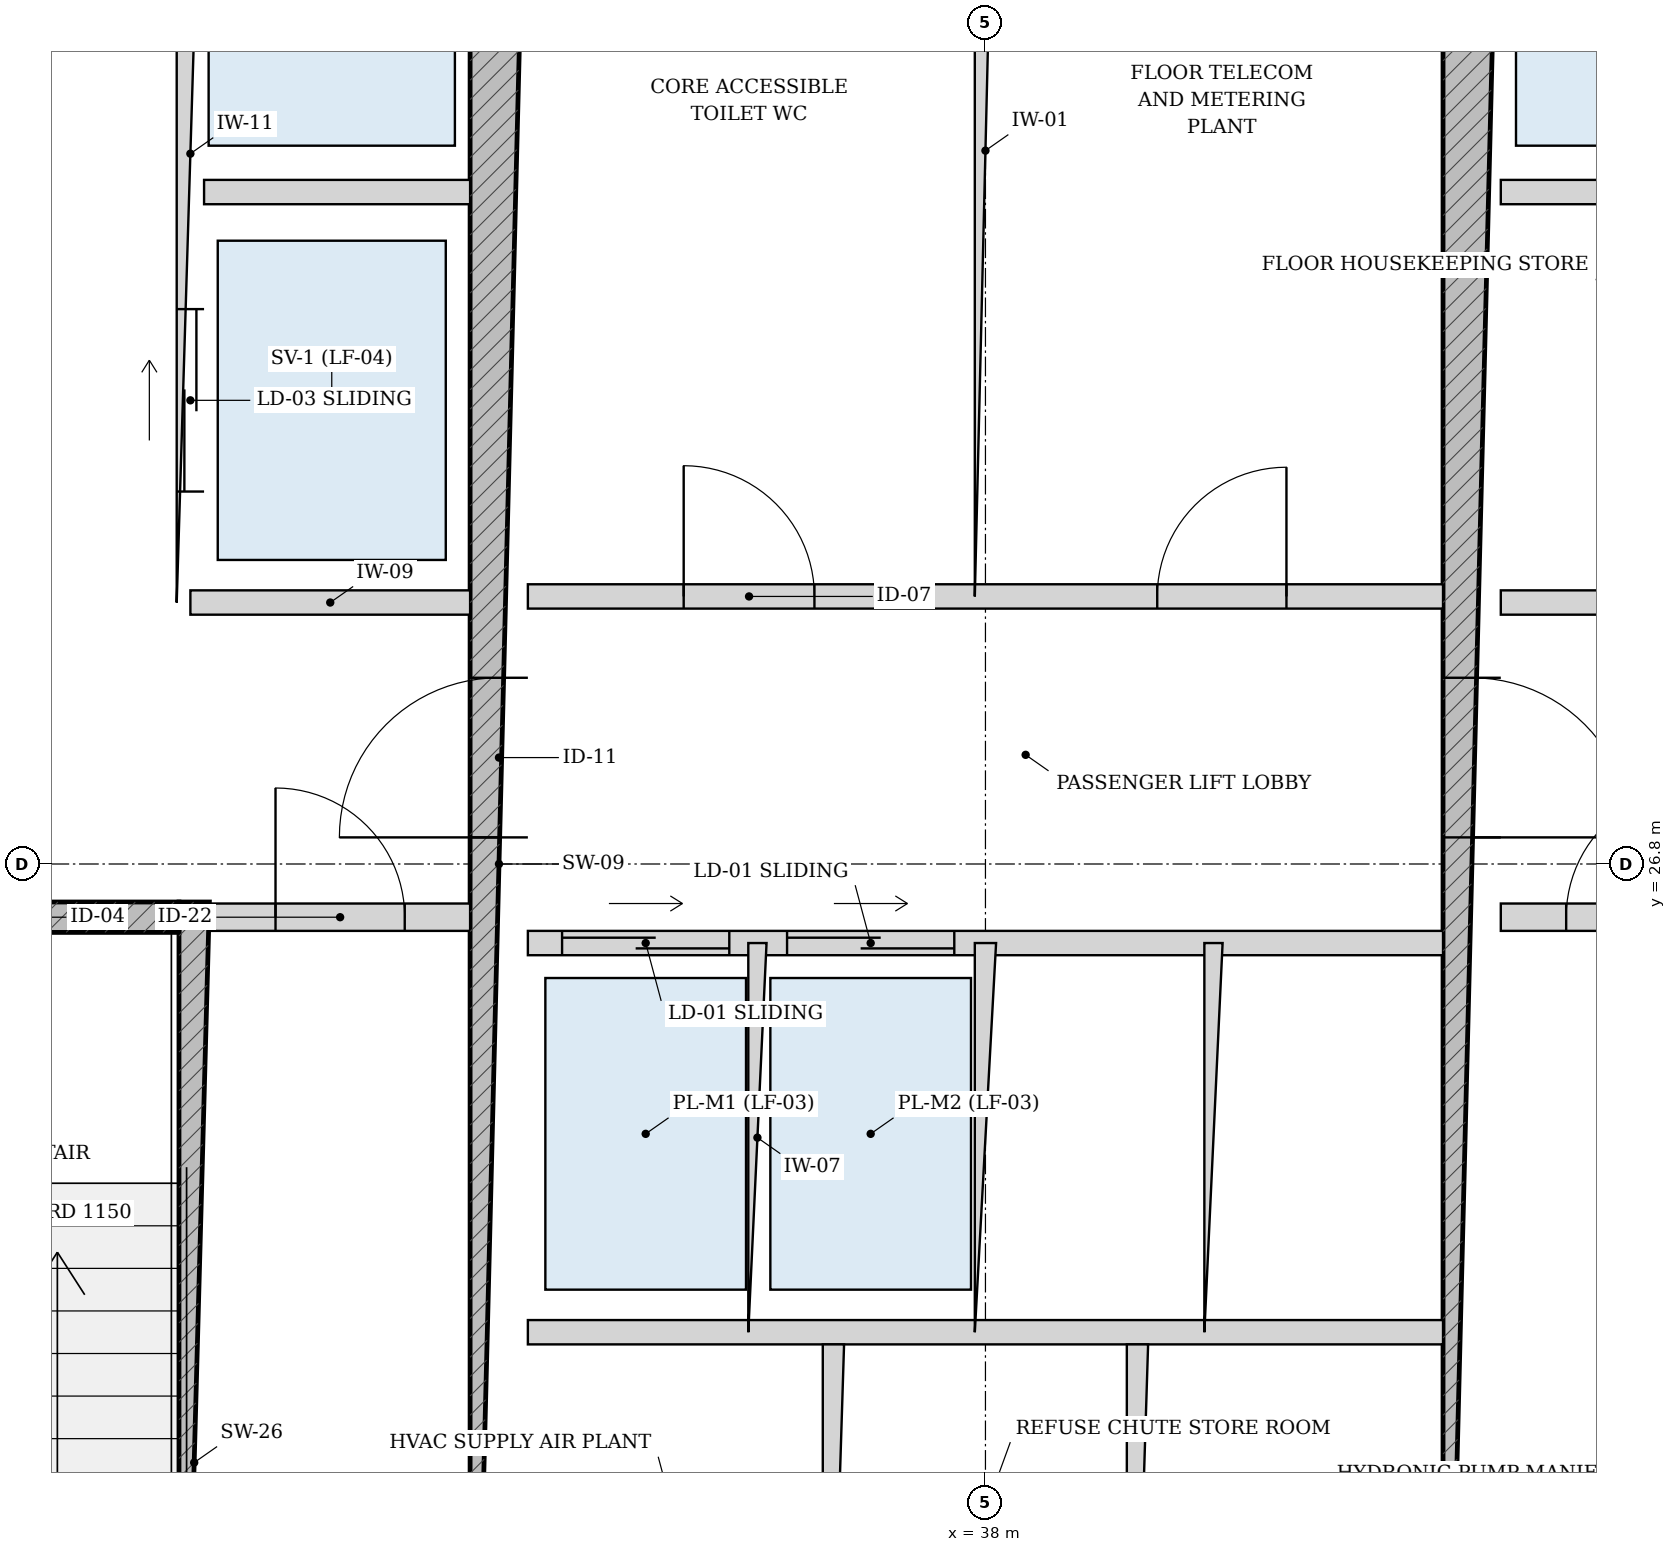
"""IFC4 building model, lengths in metres.
Left out: names, types, materials, properties, quantities, classifications, styles, units other than length and angle.
Written with IfcOpenShell. Run it as: python <this file> out.ifc"""

import sys

from ifc_helpers import new_model, si_unit, direction, frame, frame_2d, origin, place, context, subcontext, project, spatial, rectangle, extrude, source, transform, mapped, element, fill, save


model = new_model("IFC4")
c1 = context("Model", 3, precision=1e-05, world=origin(), true_north=direction((-0.2419218956, 0.970295726276)))
c2 = subcontext(c1, "Body", "Model", "MODEL_VIEW")
j1 = project(units=[si_unit("LENGTHUNIT", "METRE"), si_unit("PLANEANGLEUNIT", "RADIAN")], contexts=[c1])
p1 = place(None, origin())
s1 = spatial("IfcSite", under=j1, at=p1, CompositionType="ELEMENT")
p2 = place(p1, origin())
s2 = spatial("IfcBuilding", under=s1, at=p2, CompositionType="ELEMENT")
p3 = place(p2, frame((0.0, 0.0, 142.6)))
s3 = spatial("IfcBuildingStorey", under=s2, at=p3, CompositionType="ELEMENT", Elevation=142.6)
p4 = place(p3, frame((32.795, 19.175, 0.0), z_axis=(0.0, 0.0, 1.0), x_axis=(0.0, 1.0, 0.0)))
e1 = element("IfcWall", 1, at=p4, inside=s3, PredefinedType="SOLIDWALL", context=c2, shape_type="SweptSolid", body=[
    extrude(rectangle(XDim=7.375, YDim=0.2, at=frame_2d((3.688, 0.0))), origin(), (0.0, 0.0, 1.0), 3.33),
])
p5 = place(p3, frame((29.375, 26.45, 0.0), z_axis=(0.0, 0.0, 1.0), x_axis=(1.0, 0.0, 0.0)))
e2 = element("IfcWall", 2, at=p5, inside=s3, PredefinedType="SOLIDWALL", context=c2, shape_type="SweptSolid", body=[
    extrude(rectangle(XDim=3.32, YDim=0.2, at=frame_2d((1.66, 0.0))), origin(), (0.0, 0.0, 1.0), 3.33),
])
p6 = place(p5, frame((1.185, 0.0, 0.0)))
e3 = element("IfcOpeningElement", 3, at=p6, cuts=e2, PredefinedType="OPENING", context=c2, shape_type="SweptSolid", body=[
    extrude(rectangle(XDim=0.95, YDim=2.15, at=frame_2d((0.475, 1.075))), frame((0.0, 0.11, 0.0), z_axis=(0.0, -1.0, 0.0), x_axis=(1.0, 0.0, 0.0)), (0.0, 0.0, 1.0), 0.22),
])
p7 = place(p3, frame((34.8, 19.175, 0.0), z_axis=(0.0, 0.0, 1.0), x_axis=(0.0, 1.0, 0.0)))
e4 = element("IfcWall", 4, at=p7, inside=s3, PredefinedType="SHEAR", context=c2, shape_type="SweptSolid", body=[
    extrude(rectangle(XDim=15.25, YDim=0.38, at=frame_2d((7.625, 0.0))), origin(), (0.0, 0.0, 1.0), 3.33),
])
p8 = place(p7, frame((7.8, 0.0, 0.0)))
e5 = element("IfcOpeningElement", 5, at=p8, cuts=e4, PredefinedType="OPENING", context=c2, shape_type="SweptSolid", body=[
    extrude(rectangle(XDim=1.05, YDim=2.15, at=frame_2d((0.525, 1.075))), frame((0.0, 0.2, 0.0), z_axis=(0.0, -1.0, 0.0), x_axis=(1.0, 0.0, 0.0)), (0.0, 0.0, 1.0), 0.4),
])
p9 = place(p3, frame((41.2, 19.175, 0.0), z_axis=(0.0, 0.0, 1.0), x_axis=(0.0, 1.0, 0.0)))
e6 = element("IfcWall", 6, at=p9, inside=s3, PredefinedType="SHEAR", context=c2, shape_type="SweptSolid", body=[
    extrude(rectangle(XDim=15.25, YDim=0.38, at=frame_2d((7.625, 0.0))), origin(), (0.0, 0.0, 1.0), 3.33),
])
p10 = place(p9, frame((7.8, 0.0, 0.0)))
e7 = element("IfcOpeningElement", 7, at=p10, cuts=e6, PredefinedType="OPENING", context=c2, shape_type="SweptSolid", body=[
    extrude(rectangle(XDim=1.05, YDim=2.15, at=frame_2d((0.525, 1.075))), frame((0.0, 0.2, 0.0), z_axis=(0.0, -1.0, 0.0), x_axis=(1.0, 0.0, 0.0)), (0.0, 0.0, 1.0), 0.4),
])
p11 = place(p3, frame((32.9, 26.45, 0.0), z_axis=(0.0, 0.0, 1.0), x_axis=(1.0, 0.0, 0.0)))
e8 = element("IfcWall", 8, at=p11, inside=s3, PredefinedType="PARTITIONING", context=c2, shape_type="SweptSolid", body=[
    extrude(rectangle(XDim=1.71, YDim=0.18, at=frame_2d((0.855, 0.0))), origin(), (0.0, 0.0, 1.0), 3.33),
])
p12 = place(p11, frame((0.43, 0.0, 0.0)))
e9 = element("IfcOpeningElement", 9, at=p12, cuts=e8, PredefinedType="OPENING", context=c2, shape_type="SweptSolid", body=[
    extrude(rectangle(XDim=0.85, YDim=2.1, at=frame_2d((0.425, 1.05))), frame((0.0, 0.1, 0.0), z_axis=(0.0, -1.0, 0.0), x_axis=(1.0, 0.0, 0.0)), (0.0, 0.0, 1.0), 0.2),
])
p13 = place(p3, frame((41.39, 26.45, 0.0), z_axis=(0.0, 0.0, 1.0), x_axis=(1.0, 0.0, 0.0)))
e10 = element("IfcWall", 10, at=p13, inside=s3, PredefinedType="PARTITIONING", context=c2, shape_type="SweptSolid", body=[
    extrude(rectangle(XDim=1.71, YDim=0.18, at=frame_2d((0.855, 0.0))), origin(), (0.0, 0.0, 1.0), 3.33),
])
p14 = place(p13, frame((0.43, 0.0, 0.0)))
e11 = element("IfcOpeningElement", 11, at=p14, cuts=e10, PredefinedType="OPENING", context=c2, shape_type="SweptSolid", body=[
    extrude(rectangle(XDim=0.85, YDim=2.1, at=frame_2d((0.425, 1.05))), frame((0.0, 0.1, 0.0), z_axis=(0.0, -1.0, 0.0), x_axis=(1.0, 0.0, 0.0)), (0.0, 0.0, 1.0), 0.2),
])
p15 = place(p3, frame((32.77, 28.52, 0.0), z_axis=(0.0, 0.0, 1.0), x_axis=(0.0, 1.0, 0.0)))
e12 = element("IfcWall", 12, at=p15, inside=s3, PredefinedType="PARTITIONING", context=c2, shape_type="SweptSolid", body=[
    extrude(rectangle(XDim=5.905, YDim=0.18, at=frame_2d((2.953, 0.0))), origin(), (0.0, 0.0, 1.0), 3.33),
])
p16 = place(p15, frame((3.655, 0.0, 0.0)))
e13 = element("IfcOpeningElement", 13, at=p16, cuts=e12, PredefinedType="OPENING", context=c2, shape_type="SweptSolid", body=[
    extrude(rectangle(XDim=1.15, YDim=2.2, at=frame_2d((0.575, 1.1))), frame((0.0, 0.1, 0.0), z_axis=(0.0, -1.0, 0.0), x_axis=(1.0, 0.0, 0.0)), (0.0, 0.0, 1.0), 0.2),
])
p17 = place(p15, frame((0.73, 0.0, 0.0)))
e14 = element("IfcOpeningElement", 14, at=p17, cuts=e12, PredefinedType="OPENING", context=c2, shape_type="SweptSolid", body=[
    extrude(rectangle(XDim=1.2, YDim=2.25, at=frame_2d((0.6, 1.125))), frame((0.0, 0.1, 0.0), z_axis=(0.0, -1.0, 0.0), x_axis=(1.0, 0.0, 0.0)), (0.0, 0.0, 1.0), 0.2),
])
p18 = place(p3, frame((32.86, 31.22, 0.0), z_axis=(0.0, 0.0, 1.0), x_axis=(1.0, 0.0, 0.0)))
e15 = element("IfcWall", 15, at=p18, inside=s3, PredefinedType="PARTITIONING", context=c2, shape_type="SweptSolid", body=[
    extrude(rectangle(XDim=1.75, YDim=0.16, at=frame_2d((0.875, 0.0))), origin(), (0.0, 0.0, 1.0), 3.33),
])
p19 = place(p3, frame((32.77, 28.52, 0.0), z_axis=(0.0, 0.0, 1.0), x_axis=(1.0, 0.0, 0.0)))
e16 = element("IfcWall", 16, at=p19, inside=s3, PredefinedType="PARTITIONING", context=c2, shape_type="SweptSolid", body=[
    extrude(rectangle(XDim=1.84, YDim=0.16, at=frame_2d((0.92, 0.0))), origin(), (0.0, 0.0, 1.0), 3.33),
])
p20 = place(p3, frame((41.39, 31.22, 0.0), z_axis=(0.0, 0.0, 1.0), x_axis=(1.0, 0.0, 0.0)))
e17 = element("IfcWall", 17, at=p20, inside=s3, PredefinedType="PARTITIONING", context=c2, shape_type="SweptSolid", body=[
    extrude(rectangle(XDim=1.75, YDim=0.16, at=frame_2d((0.875, 0.0))), origin(), (0.0, 0.0, 1.0), 3.33),
])
p21 = place(p3, frame((41.39, 28.52, 0.0), z_axis=(0.0, 0.0, 1.0), x_axis=(1.0, 0.0, 0.0)))
e18 = element("IfcWall", 18, at=p21, inside=s3, PredefinedType="PARTITIONING", context=c2, shape_type="SweptSolid", body=[
    extrude(rectangle(XDim=1.84, YDim=0.16, at=frame_2d((0.92, 0.0))), origin(), (0.0, 0.0, 1.0), 3.33),
])
p22 = place(p3, frame((34.99, 28.56, 0.0), z_axis=(0.0, 0.0, 1.0), x_axis=(1.0, 0.0, 0.0)))
e19 = element("IfcWall", 19, at=p22, inside=s3, PredefinedType="PARTITIONING", context=c2, shape_type="SweptSolid", body=[
    extrude(rectangle(XDim=6.02, YDim=0.16, at=frame_2d((3.01, 0.0))), origin(), (0.0, 0.0, 1.0), 3.33),
])
p23 = place(p22, frame((1.025, 0.0, 0.0)))
e20 = element("IfcOpeningElement", 20, at=p23, cuts=e19, PredefinedType="OPENING", context=c2, shape_type="SweptSolid", body=[
    extrude(rectangle(XDim=0.86, YDim=2.1, at=frame_2d((0.43, 1.05))), frame((0.0, 0.09, 0.0), z_axis=(0.0, -1.0, 0.0), x_axis=(1.0, 0.0, 0.0)), (0.0, 0.0, 1.0), 0.18),
])
p24 = place(p22, frame((4.14, 0.0, 0.0)))
e21 = element("IfcOpeningElement", 21, at=p24, cuts=e19, PredefinedType="OPENING", context=c2, shape_type="SweptSolid", body=[
    extrude(rectangle(XDim=0.85, YDim=2.1, at=frame_2d((0.425, 1.05))), frame((0.0, 0.09, 0.0), z_axis=(0.0, -1.0, 0.0), x_axis=(1.0, 0.0, 0.0)), (0.0, 0.0, 1.0), 0.18),
])
p25 = place(p3, frame((38.0, 28.56, 0.0), z_axis=(0.0, 0.0, 1.0), x_axis=(0.0, 1.0, 0.0)))
e22 = element("IfcWall", 22, at=p25, inside=s3, PredefinedType="PARTITIONING", context=c2, shape_type="SweptSolid", body=[
    extrude(rectangle(XDim=5.865, YDim=0.14, at=frame_2d((2.933, 0.0))), origin(), (0.0, 0.0, 1.0), 3.33),
])
p26 = place(p3, frame((34.99, 26.28, 0.0), z_axis=(0.0, 0.0, 1.0), x_axis=(1.0, 0.0, 0.0)))
e23 = element("IfcWall", 23, at=p26, inside=s3, PredefinedType="PARTITIONING", context=c2, shape_type="SweptSolid", body=[
    extrude(rectangle(XDim=6.02, YDim=0.16, at=frame_2d((3.01, 0.0))), origin(), (0.0, 0.0, 1.0), 3.33),
])
p27 = place(p26, frame((0.225, 0.0, 0.0)))
e24 = element("IfcOpeningElement", 24, at=p27, cuts=e23, PredefinedType="OPENING", context=c2, shape_type="SweptSolid", body=[
    extrude(rectangle(XDim=1.1, YDim=2.2, at=frame_2d((0.55, 1.1))), frame((0.0, 0.09, 0.0), z_axis=(0.0, -1.0, 0.0), x_axis=(1.0, 0.0, 0.0)), (0.0, 0.0, 1.0), 0.18),
])
p28 = place(p26, frame((1.705, 0.0, 0.0)))
e25 = element("IfcOpeningElement", 25, at=p28, cuts=e23, PredefinedType="OPENING", context=c2, shape_type="SweptSolid", body=[
    extrude(rectangle(XDim=1.1, YDim=2.2, at=frame_2d((0.55, 1.1))), frame((0.0, 0.09, 0.0), z_axis=(0.0, -1.0, 0.0), x_axis=(1.0, 0.0, 0.0)), (0.0, 0.0, 1.0), 0.18),
])
p29 = place(p3, frame((34.99, 23.72, 0.0), z_axis=(0.0, 0.0, 1.0), x_axis=(1.0, 0.0, 0.0)))
e26 = element("IfcWall", 26, at=p29, inside=s3, PredefinedType="PARTITIONING", context=c2, shape_type="SweptSolid", body=[
    extrude(rectangle(XDim=6.02, YDim=0.16, at=frame_2d((3.01, 0.0))), origin(), (0.0, 0.0, 1.0), 3.33),
])
p30 = place(p3, frame((36.5, 23.72, 0.0), z_axis=(0.0, 0.0, 1.0), x_axis=(0.0, 1.0, 0.0)))
e27 = element("IfcWall", 27, at=p30, inside=s3, PredefinedType="PARTITIONING", context=c2, shape_type="SweptSolid", body=[
    extrude(rectangle(XDim=2.56, YDim=0.12, at=frame_2d((1.28, 0.0))), origin(), (0.0, 0.0, 1.0), 3.33),
])
p31 = place(p3, frame((38.0, 23.72, 0.0), z_axis=(0.0, 0.0, 1.0), x_axis=(0.0, 1.0, 0.0)))
e28 = element("IfcWall", 28, at=p31, inside=s3, PredefinedType="PARTITIONING", context=c2, shape_type="SweptSolid", body=[
    extrude(rectangle(XDim=2.56, YDim=0.14, at=frame_2d((1.28, 0.0))), origin(), (0.0, 0.0, 1.0), 3.33),
])
p32 = place(p3, frame((39.5, 23.72, 0.0), z_axis=(0.0, 0.0, 1.0), x_axis=(0.0, 1.0, 0.0)))
e29 = element("IfcWall", 29, at=p32, inside=s3, PredefinedType="PARTITIONING", context=c2, shape_type="SweptSolid", body=[
    extrude(rectangle(XDim=2.56, YDim=0.12, at=frame_2d((1.28, 0.0))), origin(), (0.0, 0.0, 1.0), 3.33),
])
p33 = place(p3, frame((37.0, 19.175, 0.0), z_axis=(0.0, 0.0, 1.0), x_axis=(0.0, 1.0, 0.0)))
e30 = element("IfcWall", 30, at=p33, inside=s3, PredefinedType="PARTITIONING", context=c2, shape_type="SweptSolid", body=[
    extrude(rectangle(XDim=4.465, YDim=0.14, at=frame_2d((2.232, 0.0))), origin(), (0.0, 0.0, 1.0), 3.33),
])
p34 = place(p33, frame((1.808, 0.0, 0.0)))
e31 = element("IfcOpeningElement", 31, at=p34, cuts=e30, PredefinedType="OPENING", context=c2, shape_type="SweptSolid", body=[
    extrude(rectangle(XDim=0.85, YDim=2.1, at=frame_2d((0.425, 1.05))), frame((0.0, 0.08, 0.0), z_axis=(0.0, -1.0, 0.0), x_axis=(1.0, 0.0, 0.0)), (0.0, 0.0, 1.0), 0.16),
])
p35 = place(p3, frame((39.0, 19.175, 0.0), z_axis=(0.0, 0.0, 1.0), x_axis=(0.0, 1.0, 0.0)))
e32 = element("IfcWall", 32, at=p35, inside=s3, PredefinedType="PARTITIONING", context=c2, shape_type="SweptSolid", body=[
    extrude(rectangle(XDim=4.465, YDim=0.14, at=frame_2d((2.232, 0.0))), origin(), (0.0, 0.0, 1.0), 3.33),
])
p36 = place(p35, frame((1.808, 0.0, 0.0)))
e33 = element("IfcOpeningElement", 33, at=p36, cuts=e32, PredefinedType="OPENING", context=c2, shape_type="SweptSolid", body=[
    extrude(rectangle(XDim=0.85, YDim=2.1, at=frame_2d((0.425, 1.05))), frame((0.0, 0.08, 0.0), z_axis=(0.0, -1.0, 0.0), x_axis=(1.0, 0.0, 0.0)), (0.0, 0.0, 1.0), 0.16),
])
m1 = source(origin(), c2, "Body", "SweptSolid", [
    extrude(rectangle(XDim=1.05, YDim=2.15, at=frame_2d((0.525, 1.075))), frame((0.0, 0.025, 0.0), z_axis=(0.0, -1.0, 0.0), x_axis=(1.0, 0.0, 0.0)), (0.0, 0.0, 1.0), 0.05),
])
p37 = place(p8, origin())
e34 = element("IfcDoor", 34, at=p37, inside=s3, OperationType="SINGLE_SWING_LEFT", PredefinedType="DOOR", context=c2, shape_type="MappedRepresentation", body=[
    mapped(m1, transform((0.0, 0.0, 0.0), scale=1.0)),
])
fill(e5, e34)
p38 = place(p10, frame((1.05, 0.0, 0.0), z_axis=(0.0, 0.0, 1.0), x_axis=(-1.0, 0.0, 0.0)))
e35 = element("IfcDoor", 35, at=p38, inside=s3, OperationType="SINGLE_SWING_RIGHT", PredefinedType="DOOR", context=c2, shape_type="MappedRepresentation", body=[
    mapped(m1, transform((0.0, 0.0, 0.0), scale=1.0)),
])
fill(e7, e35)
m2 = source(origin(), c2, "Body", "SweptSolid", [
    extrude(rectangle(XDim=0.85, YDim=2.1, at=frame_2d((0.425, 1.05))), frame((0.0, 0.025, 0.0), z_axis=(0.0, -1.0, 0.0), x_axis=(1.0, 0.0, 0.0)), (0.0, 0.0, 1.0), 0.05),
])
p39 = place(p12, origin())
e36 = element("IfcDoor", 36, at=p39, inside=s3, OperationType="SINGLE_SWING_LEFT", PredefinedType="DOOR", context=c2, shape_type="MappedRepresentation", body=[
    mapped(m2, transform((0.0, 0.0, 0.0), scale=1.0)),
])
fill(e9, e36)
p40 = place(p14, origin())
e37 = element("IfcDoor", 37, at=p40, inside=s3, OperationType="SINGLE_SWING_RIGHT", PredefinedType="DOOR", context=c2, shape_type="MappedRepresentation", body=[
    mapped(m2, transform((0.0, 0.0, 0.0), scale=1.0)),
])
fill(e11, e37)
m3 = source(origin(), c2, "Body", "SweptSolid", [
    extrude(rectangle(XDim=0.86, YDim=2.1, at=frame_2d((0.43, 1.05))), frame((0.0, 0.025, 0.0), z_axis=(0.0, -1.0, 0.0), x_axis=(1.0, 0.0, 0.0)), (0.0, 0.0, 1.0), 0.05),
])
p41 = place(p23, origin())
e38 = element("IfcDoor", 38, at=p41, inside=s3, OperationType="SINGLE_SWING_LEFT", PredefinedType="DOOR", context=c2, shape_type="MappedRepresentation", body=[
    mapped(m3, transform((0.0, 0.0, 0.0), scale=1.0)),
])
fill(e20, e38)
p42 = place(p24, origin())
e39 = element("IfcDoor", 39, at=p42, inside=s3, OperationType="SINGLE_SWING_RIGHT", PredefinedType="DOOR", context=c2, shape_type="MappedRepresentation", body=[
    mapped(m2, transform((0.0, 0.0, 0.0), scale=1.0)),
])
fill(e21, e39)
m4 = source(origin(), c2, "Body", "SweptSolid", [
    extrude(rectangle(XDim=1.2, YDim=2.25, at=frame_2d((0.6, 1.125))), frame((0.0, 0.025, 0.0), z_axis=(0.0, -1.0, 0.0), x_axis=(1.0, 0.0, 0.0)), (0.0, 0.0, 1.0), 0.05),
])
p43 = place(p17, origin())
e40 = element("IfcDoor", 40, at=p43, inside=s3, OperationType="DOUBLE_DOOR_SLIDING", PredefinedType="DOOR", context=c2, shape_type="MappedRepresentation", body=[
    mapped(m4, transform((0.0, 0.0, 0.0), scale=1.0)),
])
fill(e14, e40)
m5 = source(origin(), c2, "Body", "SweptSolid", [
    extrude(rectangle(XDim=1.1, YDim=2.2, at=frame_2d((0.55, 1.1))), frame((0.0, 0.025, 0.0), z_axis=(0.0, -1.0, 0.0), x_axis=(1.0, 0.0, 0.0)), (0.0, 0.0, 1.0), 0.05),
])
p44 = place(p27, origin())
e41 = element("IfcDoor", 41, at=p44, inside=s3, OperationType="DOUBLE_DOOR_SLIDING", PredefinedType="DOOR", context=c2, shape_type="MappedRepresentation", body=[
    mapped(m5, transform((0.0, 0.0, 0.0), scale=1.0)),
])
fill(e24, e41)
p45 = place(p28, origin())
e42 = element("IfcDoor", 42, at=p45, inside=s3, OperationType="DOUBLE_DOOR_SLIDING", PredefinedType="DOOR", context=c2, shape_type="MappedRepresentation", body=[
    mapped(m5, transform((0.0, 0.0, 0.0), scale=1.0)),
])
fill(e25, e42)
save(model, sys.argv[1])
